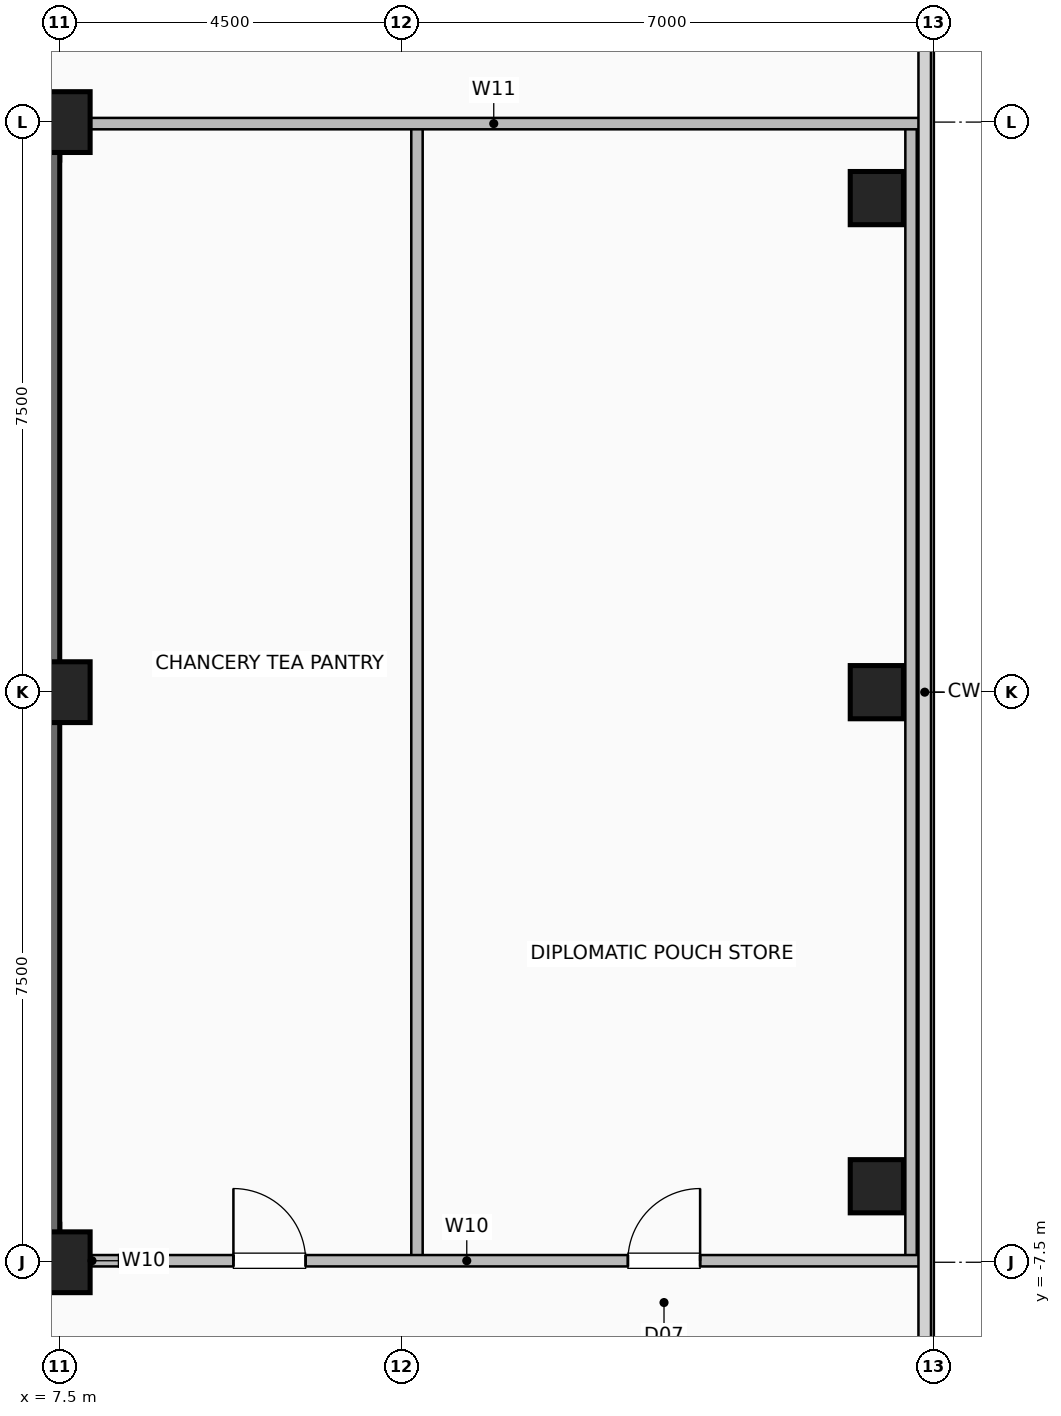
"""IFC4 building model, lengths in metres.
Left out: names, types, materials, properties, quantities, classifications, styles, units other than length and angle.
Written with IfcOpenShell. Run it as: python <this file> out.ifc"""

import sys

from ifc_helpers import new_model, si_unit, direction, frame, frame_2d, origin, origin_2d, place, context, subcontext, project, spatial, rectangle, hollow_rectangle, extrude, element, fill, save


model = new_model("IFC4")
c1 = context("Model", 3, precision=1e-05, world=origin(), true_north=direction((0.0, 1.0)))
c2 = subcontext(c1, "Body", "Model", "MODEL_VIEW")
j1 = project(units=[si_unit("LENGTHUNIT", "METRE"), si_unit("PLANEANGLEUNIT", "RADIAN")], contexts=[c1])
p1 = place(None, origin())
s1 = spatial("IfcSite", under=j1, at=p1, CompositionType="ELEMENT")
p2 = place(p1, origin())
s2 = spatial("IfcBuilding", under=s1, at=p2, CompositionType="ELEMENT")
p3 = place(p2, frame((0.0, 0.0, 232.4)))
s3 = spatial("IfcBuildingStorey", under=s2, at=p3, CompositionType="ELEMENT", Elevation=232.4)
for number, where, z_axis, x_axis in (
    (1, (7.5, -7.5, 0.0), (0.0, 0.0, 1.0), (1.0, 0.0, 0.0)),
    (2, (7.5, 0.0, 0.0), (0.0, 0.0, 1.0), (1.0, 0.0, 0.0)),
    (3, (7.5, 7.5, 0.0), (0.0, 0.0, 1.0), (1.0, 0.0, 0.0)),
):
    element("IfcColumn", number, at=place(p3, frame(where, z_axis=z_axis, x_axis=x_axis)), inside=s3, PredefinedType="COLUMN", context=c2, shape_type="SweptSolid", body=[
        extrude(hollow_rectangle(XDim=0.8, YDim=0.8, WallThickness=0.04, at=origin_2d()), origin(), (0.0, 0.0, 1.0), 3.6),
    ])
for number, where, z_axis, x_axis in (
    (4, (18.25, -6.5, -0.4), (0.0, 0.0, 1.0), (1.0, 0.0, 0.0)),
    (5, (18.25, 0.0, -0.4), (0.0, 0.0, 1.0), (1.0, 0.0, 0.0)),
    (6, (18.25, 6.5, -0.4), (0.0, 0.0, 1.0), (1.0, 0.0, 0.0)),
):
    element("IfcColumn", number, at=place(p3, frame(where, z_axis=z_axis, x_axis=x_axis)), inside=s3, PredefinedType="COLUMN", context=c2, shape_type="SweptSolid", body=[
        extrude(hollow_rectangle(XDim=0.7, YDim=0.7, WallThickness=0.035, at=origin_2d()), origin(), (0.0, 0.0, 1.0), 4.0),
    ])
p4 = place(p3, frame((-7.5, -7.25, 0.0), z_axis=(0.0, 0.0, 1.0), x_axis=(1.0, 0.0, 0.0)))
e7 = element("IfcWall", 7, at=p4, inside=s3, PredefinedType="SHEAR", context=c2, shape_type="SweptSolid", body=[
    extrude(rectangle(XDim=15.0, YDim=0.5, at=frame_2d((7.5, 0.0))), origin(), (0.0, 0.0, 1.0), 3.36),
])
p5 = place(p4, frame((1.55, 0.0, 0.0)))
e8 = element("IfcOpeningElement", 8, at=p5, cuts=e7, PredefinedType="OPENING", context=c2, shape_type="SweptSolid", body=[
    extrude(rectangle(XDim=1.05, YDim=2.08, at=frame_2d((0.525, 1.04))), frame((0.0, 0.26, 0.0), z_axis=(0.0, -1.0, 0.0), x_axis=(1.0, 0.0, 0.0)), (0.0, 0.0, 1.0), 0.52),
])
p6 = place(p4, frame((12.4, 0.0, 0.0)))
e9 = element("IfcOpeningElement", 9, at=p6, cuts=e7, PredefinedType="OPENING", context=c2, shape_type="SweptSolid", body=[
    extrude(rectangle(XDim=1.05, YDim=2.08, at=frame_2d((0.525, 1.04))), frame((0.0, 0.26, 0.0), z_axis=(0.0, -1.0, 0.0), x_axis=(1.0, 0.0, 0.0)), (0.0, 0.0, 1.0), 0.52),
])
p7 = place(p4, frame((5.2, 0.0, 0.0)))
e10 = element("IfcOpeningElement", 10, at=p7, cuts=e7, PredefinedType="OPENING", context=c2, shape_type="SweptSolid", body=[
    extrude(rectangle(XDim=1.0, YDim=2.08, at=frame_2d((0.5, 1.04))), frame((0.0, 0.26, 0.0), z_axis=(0.0, -1.0, 0.0), x_axis=(1.0, 0.0, 0.0)), (0.0, 0.0, 1.0), 0.52),
])
p8 = place(p4, frame((8.65, 0.0, 0.0)))
e11 = element("IfcOpeningElement", 11, at=p8, cuts=e7, PredefinedType="OPENING", context=c2, shape_type="SweptSolid", body=[
    extrude(rectangle(XDim=1.0, YDim=2.08, at=frame_2d((0.5, 1.04))), frame((0.0, 0.26, 0.0), z_axis=(0.0, -1.0, 0.0), x_axis=(1.0, 0.0, 0.0)), (0.0, 0.0, 1.0), 0.52),
])
for number, where, z_axis, x_axis in (
    (12, (-7.5, 7.25, 0.0), (0.0, 0.0, 1.0), (1.0, 0.0, 0.0)),
    (13, (7.25, -7.5, 0.0), (0.0, 0.0, 1.0), (0.0, 1.0, 0.0)),
):
    element("IfcWall", number, at=place(p3, frame(where, z_axis=z_axis, x_axis=x_axis)), inside=s3, PredefinedType="SHEAR", context=c2, shape_type="SweptSolid", body=[
        extrude(rectangle(XDim=15.0, YDim=0.5, at=frame_2d((7.5, 0.0))), origin(), (0.0, 0.0, 1.0), 3.36),
    ])
p9 = place(p3, frame((7.45, -7.48, 0.0), z_axis=(0.0, 0.0, 1.0), x_axis=(1.0, 0.0, 0.0)))
e14 = element("IfcWall", 14, at=p9, inside=s3, PredefinedType="PARTITIONING", context=c2, shape_type="SweptSolid", body=[
    extrude(rectangle(XDim=0.95, YDim=0.15, at=frame_2d((0.475, 0.0))), origin(), (0.0, 0.0, 1.0), 3.36),
])
for number, where, z_axis, x_axis in (
    (15, (12.2, -7.48, 0.0), (0.0, 0.0, 1.0), (0.0, 1.0, 0.0)),
    (16, (18.7, -7.48, 0.0), (0.0, 0.0, 1.0), (0.0, 1.0, 0.0)),
):
    element("IfcWall", number, at=place(p3, frame(where, z_axis=z_axis, x_axis=x_axis)), inside=s3, PredefinedType="PARTITIONING", context=c2, shape_type="SweptSolid", body=[
        extrude(rectangle(XDim=14.9, YDim=0.15, at=frame_2d((7.45, 0.0))), origin(), (0.0, 0.0, 1.0), 3.36),
    ])
p10 = place(p3, frame((8.28, -7.48, 0.0), z_axis=(0.0, 0.0, 1.0), x_axis=(1.0, 0.0, 0.0)))
e17 = element("IfcWall", 17, at=p10, inside=s3, PredefinedType="PARTITIONING", context=c2, shape_type="SweptSolid", body=[
    extrude(rectangle(XDim=10.54, YDim=0.15, at=frame_2d((5.27, 0.0))), origin(), (0.0, 0.0, 1.0), 3.36),
])
p11 = place(p10, frame((1.505, 0.0, 0.0)))
e18 = element("IfcOpeningElement", 18, at=p11, cuts=e17, PredefinedType="OPENING", context=c2, shape_type="SweptSolid", body=[
    extrude(rectangle(XDim=0.95, YDim=2.06, at=frame_2d((0.475, 1.03))), frame((0.0, 0.085, 0.0), z_axis=(0.0, -1.0, 0.0), x_axis=(1.0, 0.0, 0.0)), (0.0, 0.0, 1.0), 0.17),
])
p12 = place(p10, frame((6.695, 0.0, 0.0)))
e19 = element("IfcOpeningElement", 19, at=p12, cuts=e17, PredefinedType="OPENING", context=c2, shape_type="SweptSolid", body=[
    extrude(rectangle(XDim=0.95, YDim=2.06, at=frame_2d((0.475, 1.03))), frame((0.0, 0.085, 0.0), z_axis=(0.0, -1.0, 0.0), x_axis=(1.0, 0.0, 0.0)), (0.0, 0.0, 1.0), 0.17),
])
p13 = place(p3, frame((7.6, 7.48, 0.0), z_axis=(0.0, 0.0, 1.0), x_axis=(1.0, 0.0, 0.0)))
e20 = element("IfcWall", 20, at=p13, inside=s3, PredefinedType="PARTITIONING", context=c2, shape_type="SweptSolid", body=[
    extrude(rectangle(XDim=11.22, YDim=0.15, at=frame_2d((5.61, 0.0))), origin(), (0.0, 0.0, 1.0), 3.36),
])
p14 = place(p11, origin())
e21 = element("IfcDoor", 21, at=p14, inside=s3, OperationType="SINGLE_SWING_LEFT", PredefinedType="DOOR", context=c2, shape_type="SweptSolid", body=[
    extrude(rectangle(XDim=0.95, YDim=2.06, at=frame_2d((0.475, 1.03))), frame((0.0, 0.025, 0.0), z_axis=(0.0, -1.0, 0.0), x_axis=(1.0, 0.0, 0.0)), (0.0, 0.0, 1.0), 0.05),
])
fill(e18, e21)
p15 = place(p12, origin())
e22 = element("IfcDoor", 22, at=p15, inside=s3, OperationType="SINGLE_SWING_RIGHT", PredefinedType="DOOR", context=c2, shape_type="SweptSolid", body=[
    extrude(rectangle(XDim=0.95, YDim=2.06, at=frame_2d((0.475, 1.03))), frame((0.0, 0.025, 0.0), z_axis=(0.0, -1.0, 0.0), x_axis=(1.0, 0.0, 0.0)), (0.0, 0.0, 1.0), 0.05),
])
fill(e19, e22)
save(model, sys.argv[1])
